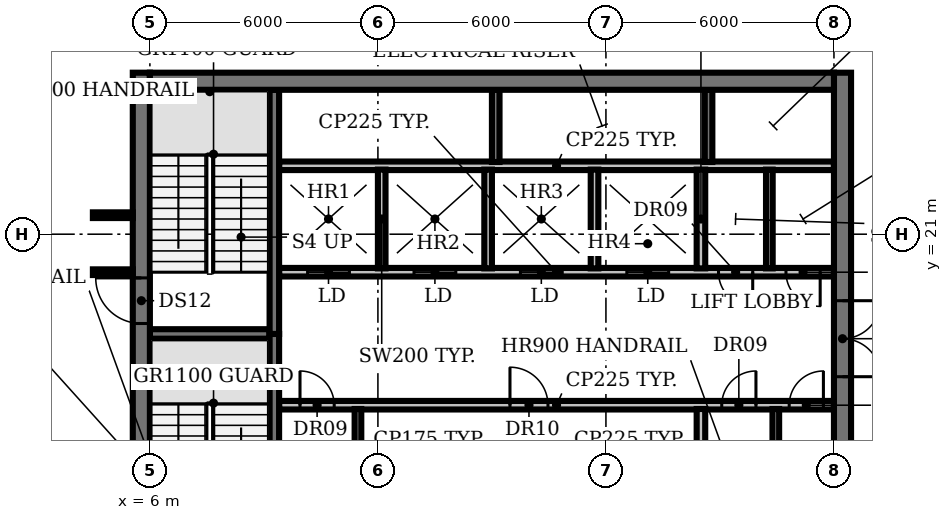
"""IFC4 building model, lengths in metres.
Left out: names, types, materials, properties, quantities, classifications, styles, units other than length and angle.
Written with IfcOpenShell. Run it as: python <this file> out.ifc"""

import sys

from ifc_helpers import new_model, si_unit, direction, frame, frame_2d, origin, place, context, subcontext, project, spatial, rectangle, extrude, element, fill, save


model = new_model("IFC4")
c1 = context("Model", 3, precision=1e-05, world=origin(), true_north=direction((0.0, 1.0)))
c2 = subcontext(c1, "Body", "Model", "MODEL_VIEW")
j1 = project(units=[si_unit("LENGTHUNIT", "METRE"), si_unit("PLANEANGLEUNIT", "RADIAN")], contexts=[c1])
p1 = place(None, origin())
s1 = spatial("IfcSite", under=j1, at=p1, CompositionType="ELEMENT")
p2 = place(p1, origin())
s2 = spatial("IfcBuilding", under=s1, at=p2, CompositionType="ELEMENT")
p3 = place(p2, frame((0.0, 0.0, 247.4)))
s3 = spatial("IfcBuildingStorey", under=s2, at=p3, CompositionType="ELEMENT", Elevation=247.4)
p4 = place(p3, frame((9.4, 16.5, 0.0), z_axis=(0.0, 0.0, 1.0), x_axis=(1.0, 0.0, 0.0)))
e1 = element("IfcWall", 1, at=p4, inside=s3, PredefinedType="PARTITIONING", context=c2, shape_type="SweptSolid", body=[
    extrude(rectangle(XDim=14.6, YDim=0.225, at=frame_2d((7.3, 0.0))), origin(), (0.0, 0.0, 1.0), 3.85),
])
p5 = place(p4, frame((0.55, 0.0, 0.0)))
e2 = element("IfcOpeningElement", 2, at=p5, cuts=e1, PredefinedType="OPENING", context=c2, shape_type="SweptSolid", body=[
    extrude(rectangle(XDim=0.9, YDim=2.1, at=frame_2d((0.45, 1.05))), frame((0.0, 0.123, 0.0), z_axis=(0.0, -1.0, 0.0), x_axis=(1.0, 0.0, 0.0)), (0.0, 0.0, 1.0), 0.245),
])
p6 = place(p4, frame((6.075, 0.0, 0.0)))
e3 = element("IfcOpeningElement", 3, at=p6, cuts=e1, PredefinedType="OPENING", context=c2, shape_type="SweptSolid", body=[
    extrude(rectangle(XDim=1.0, YDim=2.1, at=frame_2d((0.5, 1.05))), frame((0.0, 0.123, 0.0), z_axis=(0.0, -1.0, 0.0), x_axis=(1.0, 0.0, 0.0)), (0.0, 0.0, 1.0), 0.245),
])
p7 = place(p4, frame((11.647, 0.0, 0.0)))
e4 = element("IfcOpeningElement", 4, at=p7, cuts=e1, PredefinedType="OPENING", context=c2, shape_type="SweptSolid", body=[
    extrude(rectangle(XDim=0.9, YDim=2.1, at=frame_2d((0.45, 1.05))), frame((0.0, 0.123, 0.0), z_axis=(0.0, -1.0, 0.0), x_axis=(1.0, 0.0, 0.0)), (0.0, 0.0, 1.0), 0.245),
])
p8 = place(p4, frame((13.423, 0.0, 0.0)))
e5 = element("IfcOpeningElement", 5, at=p8, cuts=e1, PredefinedType="OPENING", context=c2, shape_type="SweptSolid", body=[
    extrude(rectangle(XDim=0.9, YDim=2.1, at=frame_2d((0.45, 1.05))), frame((0.0, 0.123, 0.0), z_axis=(0.0, -1.0, 0.0), x_axis=(1.0, 0.0, 0.0)), (0.0, 0.0, 1.0), 0.245),
])
p9 = place(p3, frame((6.0, 18.375, 0.0), z_axis=(0.0, 0.0, 1.0), x_axis=(1.0, 0.0, 0.0)))
e6 = element("IfcWall", 6, at=p9, inside=s3, PredefinedType="SHEAR", context=c2, shape_type="SweptSolid", body=[
    extrude(rectangle(XDim=3.15, YDim=0.25, at=frame_2d((1.575, 0.0))), origin(), (0.0, 0.0, 1.0), 3.85),
])
p10 = place(p3, frame((24.0, 20.0, 0.0), z_axis=(0.0, 0.0, 1.0), x_axis=(-1.0, 0.0, 0.0)))
e7 = element("IfcWall", 7, at=p10, inside=s3, PredefinedType="PARTITIONING", context=c2, shape_type="SweptSolid", body=[
    extrude(rectangle(XDim=14.6, YDim=0.225, at=frame_2d((7.3, 0.0))), origin(), (0.0, 0.0, 1.0), 3.85),
])
p11 = place(p10, frame((12.75, 0.0, 0.0)))
e8 = element("IfcOpeningElement", 8, at=p11, cuts=e7, PredefinedType="OPENING", context=c2, shape_type="SweptSolid", body=[
    extrude(rectangle(XDim=1.1, YDim=2.1, at=frame_2d((0.55, 1.05))), frame((0.0, 0.123, 0.0), z_axis=(0.0, -1.0, 0.0), x_axis=(1.0, 0.0, 0.0)), (0.0, 0.0, 1.0), 0.245),
])
p12 = place(p10, frame((9.95, 0.0, 0.0)))
e9 = element("IfcOpeningElement", 9, at=p12, cuts=e7, PredefinedType="OPENING", context=c2, shape_type="SweptSolid", body=[
    extrude(rectangle(XDim=1.1, YDim=2.1, at=frame_2d((0.55, 1.05))), frame((0.0, 0.123, 0.0), z_axis=(0.0, -1.0, 0.0), x_axis=(1.0, 0.0, 0.0)), (0.0, 0.0, 1.0), 0.245),
])
p13 = place(p10, frame((7.15, 0.0, 0.0)))
e10 = element("IfcOpeningElement", 10, at=p13, cuts=e7, PredefinedType="OPENING", context=c2, shape_type="SweptSolid", body=[
    extrude(rectangle(XDim=1.1, YDim=2.1, at=frame_2d((0.55, 1.05))), frame((0.0, 0.123, 0.0), z_axis=(0.0, -1.0, 0.0), x_axis=(1.0, 0.0, 0.0)), (0.0, 0.0, 1.0), 0.245),
])
p14 = place(p10, frame((4.35, 0.0, 0.0)))
e11 = element("IfcOpeningElement", 11, at=p14, cuts=e7, PredefinedType="OPENING", context=c2, shape_type="SweptSolid", body=[
    extrude(rectangle(XDim=1.1, YDim=2.1, at=frame_2d((0.55, 1.05))), frame((0.0, 0.123, 0.0), z_axis=(0.0, -1.0, 0.0), x_axis=(1.0, 0.0, 0.0)), (0.0, 0.0, 1.0), 0.245),
])
p15 = place(p10, frame((2.137, 0.0, 0.0)))
e12 = element("IfcOpeningElement", 12, at=p15, cuts=e7, PredefinedType="OPENING", context=c2, shape_type="SweptSolid", body=[
    extrude(rectangle(XDim=0.9, YDim=2.1, at=frame_2d((0.45, 1.05))), frame((0.0, 0.123, 0.0), z_axis=(0.0, -1.0, 0.0), x_axis=(1.0, 0.0, 0.0)), (0.0, 0.0, 1.0), 0.245),
])
p16 = place(p10, frame((0.363, 0.0, 0.0)))
e13 = element("IfcOpeningElement", 13, at=p16, cuts=e7, PredefinedType="OPENING", context=c2, shape_type="SweptSolid", body=[
    extrude(rectangle(XDim=0.9, YDim=2.1, at=frame_2d((0.45, 1.05))), frame((0.0, 0.123, 0.0), z_axis=(0.0, -1.0, 0.0), x_axis=(1.0, 0.0, 0.0)), (0.0, 0.0, 1.0), 0.245),
])
p17 = place(p3, frame((9.4, 22.8, 0.0), z_axis=(0.0, 0.0, 1.0), x_axis=(1.0, 0.0, 0.0)))
e14 = element("IfcWall", 14, at=p17, inside=s3, PredefinedType="PARTITIONING", context=c2, shape_type="SweptSolid", body=[
    extrude(rectangle(XDim=14.6, YDim=0.225, at=frame_2d((7.3, 0.0))), origin(), (0.0, 0.0, 1.0), 3.85),
])
p18 = place(p3, frame((9.275, 18.375, 0.0), z_axis=(0.0, 0.0, 1.0), x_axis=(0.0, -1.0, 0.0)))
e15 = element("IfcWall", 15, at=p18, inside=s3, PredefinedType="SHEAR", context=c2, shape_type="SweptSolid", body=[
    extrude(rectangle(XDim=6.55, YDim=0.25, at=frame_2d((3.275, 0.0))), origin(), (0.0, 0.0, 1.0), 3.85),
])
p19 = place(p18, frame((5.075, 0.0, 0.0)))
e16 = element("IfcOpeningElement", 16, at=p19, cuts=e15, PredefinedType="OPENING", context=c2, shape_type="SweptSolid", body=[
    extrude(rectangle(XDim=1.0, YDim=2.1, at=frame_2d((0.5, 1.05))), frame((0.0, 0.135, 0.0), z_axis=(0.0, -1.0, 0.0), x_axis=(1.0, 0.0, 0.0)), (0.0, 0.0, 1.0), 0.27),
])
p20 = place(p3, frame((9.275, 18.375, 0.0), z_axis=(0.0, 0.0, 1.0), x_axis=(0.0, 1.0, 0.0)))
e17 = element("IfcWall", 17, at=p20, inside=s3, PredefinedType="SHEAR", context=c2, shape_type="SweptSolid", body=[
    extrude(rectangle(XDim=6.425, YDim=0.25, at=frame_2d((3.212, 0.0))), origin(), (0.0, 0.0, 1.0), 3.85),
])
p21 = place(p3, frame((11.475, 13.8, 0.0), z_axis=(0.0, 0.0, 1.0), x_axis=(0.0, 1.0, 0.0)))
e18 = element("IfcWall", 18, at=p21, inside=s3, PredefinedType="PARTITIONING", context=c2, shape_type="SweptSolid", body=[
    extrude(rectangle(XDim=2.6, YDim=0.175, at=frame_2d((1.3, 0.0))), origin(), (0.0, 0.0, 1.0), 3.85),
])
for number, where, z_axis, x_axis in (
    (19, (12.1, 20.1, 0.0), (0.0, 0.0, 1.0), (0.0, 1.0, 0.0)),
    (20, (14.9, 20.1, 0.0), (0.0, 0.0, 1.0), (0.0, 1.0, 0.0)),
):
    element("IfcWall", number, at=place(p3, frame(where, z_axis=z_axis, x_axis=x_axis)), inside=s3, PredefinedType="SOLIDWALL", context=c2, shape_type="SweptSolid", body=[
        extrude(rectangle(XDim=2.6, YDim=0.2, at=frame_2d((1.3, 0.0))), origin(), (0.0, 0.0, 1.0), 3.85),
    ])
p22 = place(p3, frame((15.1, 22.9, 0.0), z_axis=(0.0, 0.0, 1.0), x_axis=(0.0, 1.0, 0.0)))
e21 = element("IfcWall", 21, at=p22, inside=s3, PredefinedType="SHEAR", context=c2, shape_type="SweptSolid", body=[
    extrude(rectangle(XDim=1.9, YDim=0.2, at=frame_2d((0.95, 0.0))), origin(), (0.0, 0.0, 1.0), 3.85),
])
p23 = place(p3, frame((17.7, 20.1, 0.0), z_axis=(0.0, 0.0, 1.0), x_axis=(0.0, 1.0, 0.0)))
e22 = element("IfcWall", 22, at=p23, inside=s3, PredefinedType="SOLIDWALL", context=c2, shape_type="SweptSolid", body=[
    extrude(rectangle(XDim=2.6, YDim=0.2, at=frame_2d((1.3, 0.0))), origin(), (0.0, 0.0, 1.0), 3.85),
])
for number, where, z_axis, x_axis in (
    (23, (20.5, 13.8, 0.0), (0.0, 0.0, 1.0), (0.0, 1.0, 0.0)),
    (24, (20.5, 20.1, 0.0), (0.0, 0.0, 1.0), (0.0, 1.0, 0.0)),
):
    element("IfcWall", number, at=place(p3, frame(where, z_axis=z_axis, x_axis=x_axis)), inside=s3, PredefinedType="PARTITIONING", context=c2, shape_type="SweptSolid", body=[
        extrude(rectangle(XDim=2.6, YDim=0.225, at=frame_2d((1.3, 0.0))), origin(), (0.0, 0.0, 1.0), 3.85),
    ])
p24 = place(p3, frame((20.7, 22.9, 0.0), z_axis=(0.0, 0.0, 1.0), x_axis=(0.0, 1.0, 0.0)))
e25 = element("IfcWall", 25, at=p24, inside=s3, PredefinedType="SHEAR", context=c2, shape_type="SweptSolid", body=[
    extrude(rectangle(XDim=1.9, YDim=0.2, at=frame_2d((0.95, 0.0))), origin(), (0.0, 0.0, 1.0), 3.85),
])
for number, where, z_axis, x_axis in (
    (26, (22.3, 20.1, 0.0), (0.0, 0.0, 1.0), (0.0, 1.0, 0.0)),
    (27, (22.47, 13.8, 0.0), (0.0, 0.0, 1.0), (0.0, 1.0, 0.0)),
):
    element("IfcWall", number, at=place(p3, frame(where, z_axis=z_axis, x_axis=x_axis)), inside=s3, PredefinedType="PARTITIONING", context=c2, shape_type="SweptSolid", body=[
        extrude(rectangle(XDim=2.6, YDim=0.175, at=frame_2d((1.3, 0.0))), origin(), (0.0, 0.0, 1.0), 3.85),
    ])
p25 = place(p3, frame((5.775, 4.42, 0.0), z_axis=(0.0, 0.0, 1.0), x_axis=(0.0, 1.0, 0.0)))
e28 = element("IfcWall", 28, at=p25, inside=s3, PredefinedType="SHEAR", context=c2, shape_type="SweptSolid", body=[
    extrude(rectangle(XDim=20.83, YDim=0.45, at=frame_2d((10.415, 0.0))), origin(), (0.0, 0.0, 1.0), 3.85),
])
p26 = place(p25, frame((1.23, 0.0, 0.0)))
e29 = element("IfcOpeningElement", 29, at=p26, cuts=e28, PredefinedType="OPENING", context=c2, shape_type="SweptSolid", body=[
    extrude(rectangle(XDim=1.5, YDim=2.1, at=frame_2d((0.75, 1.05))), frame((0.0, 0.235, 0.0), z_axis=(0.0, -1.0, 0.0), x_axis=(1.0, 0.0, 0.0)), (0.0, 0.0, 1.0), 0.47),
])
p27 = place(p25, frame((7.68, 0.0, 0.0)))
e30 = element("IfcOpeningElement", 30, at=p27, cuts=e28, PredefinedType="OPENING", context=c2, shape_type="SweptSolid", body=[
    extrude(rectangle(XDim=1.2, YDim=2.1, at=frame_2d((0.6, 1.05))), frame((0.0, 0.235, 0.0), z_axis=(0.0, -1.0, 0.0), x_axis=(1.0, 0.0, 0.0)), (0.0, 0.0, 1.0), 0.47),
])
p28 = place(p25, frame((14.23, 0.0, 0.0)))
e31 = element("IfcOpeningElement", 31, at=p28, cuts=e28, PredefinedType="OPENING", context=c2, shape_type="SweptSolid", body=[
    extrude(rectangle(XDim=1.2, YDim=2.1, at=frame_2d((0.6, 1.05))), frame((0.0, 0.235, 0.0), z_axis=(0.0, -1.0, 0.0), x_axis=(1.0, 0.0, 0.0)), (0.0, 0.0, 1.0), 0.47),
])
p29 = place(p3, frame((24.225, 25.25, 0.0), z_axis=(0.0, 0.0, 1.0), x_axis=(0.0, -1.0, 0.0)))
e32 = element("IfcWall", 32, at=p29, inside=s3, PredefinedType="SHEAR", context=c2, shape_type="SweptSolid", body=[
    extrude(rectangle(XDim=20.83, YDim=0.45, at=frame_2d((10.415, 0.0))), origin(), (0.0, 0.0, 1.0), 3.85),
])
p30 = place(p29, frame((18.1, 0.0, 0.0)))
e33 = element("IfcOpeningElement", 33, at=p30, cuts=e32, PredefinedType="OPENING", context=c2, shape_type="SweptSolid", body=[
    extrude(rectangle(XDim=1.5, YDim=2.1, at=frame_2d((0.75, 1.05))), frame((0.0, 0.235, 0.0), z_axis=(0.0, -1.0, 0.0), x_axis=(1.0, 0.0, 0.0)), (0.0, 0.0, 1.0), 0.47),
])
p31 = place(p29, frame((12.0, 0.0, 0.0)))
e34 = element("IfcOpeningElement", 34, at=p31, cuts=e32, PredefinedType="OPENING", context=c2, shape_type="SweptSolid", body=[
    extrude(rectangle(XDim=0.9, YDim=2.1, at=frame_2d((0.45, 1.05))), frame((0.0, 0.235, 0.0), z_axis=(0.0, -1.0, 0.0), x_axis=(1.0, 0.0, 0.0)), (0.0, 0.0, 1.0), 0.47),
])
p32 = place(p29, frame((6.0, 0.0, 0.0)))
e35 = element("IfcOpeningElement", 35, at=p32, cuts=e32, PredefinedType="OPENING", context=c2, shape_type="SweptSolid", body=[
    extrude(rectangle(XDim=2.0, YDim=2.1, at=frame_2d((1.0, 1.05))), frame((0.0, 0.235, 0.0), z_axis=(0.0, -1.0, 0.0), x_axis=(1.0, 0.0, 0.0)), (0.0, 0.0, 1.0), 0.47),
])
p33 = place(p3, frame((6.0, 25.025, 0.0), z_axis=(0.0, 0.0, 1.0), x_axis=(1.0, 0.0, 0.0)))
e36 = element("IfcWall", 36, at=p33, inside=s3, PredefinedType="SHEAR", context=c2, shape_type="SweptSolid", body=[
    extrude(rectangle(XDim=18.0, YDim=0.45, at=frame_2d((9.0, 0.0))), origin(), (0.0, 0.0, 1.0), 3.85),
])
for number, where, z_axis, x_axis in (
    (37, (4.5, 20.0, 0.0), (0.0, 0.0, 1.0), (1.0, 0.0, 0.0)),
    (38, (4.5, 21.5, 0.0), (0.0, 0.0, 1.0), (1.0, 0.0, 0.0)),
):
    element("IfcWall", number, at=place(p3, frame(where, z_axis=z_axis, x_axis=x_axis)), inside=s3, PredefinedType="PARTITIONING", context=c2, shape_type="SweptSolid", body=[
        extrude(rectangle(XDim=1.05, YDim=0.15, at=frame_2d((0.525, 0.0))), origin(), (0.0, 0.0, 1.0), 2.88),
    ])
p34 = place(p5, origin())
e39 = element("IfcDoor", 39, at=p34, inside=s3, OperationType="SINGLE_SWING_LEFT", PredefinedType="DOOR", context=c2, shape_type="SweptSolid", body=[
    extrude(rectangle(XDim=0.9, YDim=2.1, at=frame_2d((0.45, 1.05))), frame((0.0, 0.025, 0.0), z_axis=(0.0, -1.0, 0.0), x_axis=(1.0, 0.0, 0.0)), (0.0, 0.0, 1.0), 0.05),
])
fill(e2, e39)
p35 = place(p6, origin())
e40 = element("IfcDoor", 40, at=p35, inside=s3, OperationType="SINGLE_SWING_LEFT", PredefinedType="DOOR", context=c2, shape_type="SweptSolid", body=[
    extrude(rectangle(XDim=1.0, YDim=2.1, at=frame_2d((0.5, 1.05))), frame((0.0, 0.025, 0.0), z_axis=(0.0, -1.0, 0.0), x_axis=(1.0, 0.0, 0.0)), (0.0, 0.0, 1.0), 0.05),
])
fill(e3, e40)
p36 = place(p7, origin())
e41 = element("IfcDoor", 41, at=p36, inside=s3, OperationType="SINGLE_SWING_RIGHT", PredefinedType="DOOR", context=c2, shape_type="SweptSolid", body=[
    extrude(rectangle(XDim=0.9, YDim=2.1, at=frame_2d((0.45, 1.05))), frame((0.0, 0.025, 0.0), z_axis=(0.0, -1.0, 0.0), x_axis=(1.0, 0.0, 0.0)), (0.0, 0.0, 1.0), 0.05),
])
fill(e4, e41)
p37 = place(p8, origin())
e42 = element("IfcDoor", 42, at=p37, inside=s3, OperationType="SINGLE_SWING_RIGHT", PredefinedType="DOOR", context=c2, shape_type="SweptSolid", body=[
    extrude(rectangle(XDim=0.9, YDim=2.1, at=frame_2d((0.45, 1.05))), frame((0.0, 0.025, 0.0), z_axis=(0.0, -1.0, 0.0), x_axis=(1.0, 0.0, 0.0)), (0.0, 0.0, 1.0), 0.05),
])
fill(e5, e42)
p38 = place(p11, origin())
e43 = element("IfcDoor", 43, at=p38, inside=s3, OperationType="DOUBLE_DOOR_SLIDING", PredefinedType="DOOR", context=c2, shape_type="SweptSolid", body=[
    extrude(rectangle(XDim=1.1, YDim=2.1, at=frame_2d((0.55, 1.05))), frame((0.0, 0.025, 0.0), z_axis=(0.0, -1.0, 0.0), x_axis=(1.0, 0.0, 0.0)), (0.0, 0.0, 1.0), 0.05),
])
fill(e8, e43)
p39 = place(p12, origin())
e44 = element("IfcDoor", 44, at=p39, inside=s3, OperationType="DOUBLE_DOOR_SLIDING", PredefinedType="DOOR", context=c2, shape_type="SweptSolid", body=[
    extrude(rectangle(XDim=1.1, YDim=2.1, at=frame_2d((0.55, 1.05))), frame((0.0, 0.025, 0.0), z_axis=(0.0, -1.0, 0.0), x_axis=(1.0, 0.0, 0.0)), (0.0, 0.0, 1.0), 0.05),
])
fill(e9, e44)
p40 = place(p13, origin())
e45 = element("IfcDoor", 45, at=p40, inside=s3, OperationType="DOUBLE_DOOR_SLIDING", PredefinedType="DOOR", context=c2, shape_type="SweptSolid", body=[
    extrude(rectangle(XDim=1.1, YDim=2.1, at=frame_2d((0.55, 1.05))), frame((0.0, 0.025, 0.0), z_axis=(0.0, -1.0, 0.0), x_axis=(1.0, 0.0, 0.0)), (0.0, 0.0, 1.0), 0.05),
])
fill(e10, e45)
p41 = place(p14, origin())
e46 = element("IfcDoor", 46, at=p41, inside=s3, OperationType="DOUBLE_DOOR_SLIDING", PredefinedType="DOOR", context=c2, shape_type="SweptSolid", body=[
    extrude(rectangle(XDim=1.1, YDim=2.1, at=frame_2d((0.55, 1.05))), frame((0.0, 0.025, 0.0), z_axis=(0.0, -1.0, 0.0), x_axis=(1.0, 0.0, 0.0)), (0.0, 0.0, 1.0), 0.05),
])
fill(e11, e46)
p42 = place(p15, origin())
e47 = element("IfcDoor", 47, at=p42, inside=s3, OperationType="SINGLE_SWING_LEFT", PredefinedType="DOOR", context=c2, shape_type="SweptSolid", body=[
    extrude(rectangle(XDim=0.9, YDim=2.1, at=frame_2d((0.45, 1.05))), frame((0.0, 0.025, 0.0), z_axis=(0.0, -1.0, 0.0), x_axis=(1.0, 0.0, 0.0)), (0.0, 0.0, 1.0), 0.05),
])
fill(e12, e47)
p43 = place(p16, origin())
e48 = element("IfcDoor", 48, at=p43, inside=s3, OperationType="SINGLE_SWING_LEFT", PredefinedType="DOOR", context=c2, shape_type="SweptSolid", body=[
    extrude(rectangle(XDim=0.9, YDim=2.1, at=frame_2d((0.45, 1.05))), frame((0.0, 0.025, 0.0), z_axis=(0.0, -1.0, 0.0), x_axis=(1.0, 0.0, 0.0)), (0.0, 0.0, 1.0), 0.05),
])
fill(e13, e48)
p44 = place(p28, origin())
e49 = element("IfcDoor", 49, at=p44, inside=s3, OperationType="SINGLE_SWING_RIGHT", PredefinedType="DOOR", context=c2, shape_type="SweptSolid", body=[
    extrude(rectangle(XDim=1.2, YDim=2.1, at=frame_2d((0.6, 1.05))), frame((0.0, 0.025, 0.0), z_axis=(0.0, -1.0, 0.0), x_axis=(1.0, 0.0, 0.0)), (0.0, 0.0, 1.0), 0.05),
])
fill(e31, e49)
p45 = place(p32, origin())
e50 = element("IfcDoor", 50, at=p45, inside=s3, OperationType="DOUBLE_DOOR_SINGLE_SWING", PredefinedType="DOOR", context=c2, shape_type="SweptSolid", body=[
    extrude(rectangle(XDim=2.0, YDim=2.1, at=frame_2d((1.0, 1.05))), frame((0.0, 0.025, 0.0), z_axis=(0.0, -1.0, 0.0), x_axis=(1.0, 0.0, 0.0)), (0.0, 0.0, 1.0), 0.05),
])
fill(e35, e50)
save(model, sys.argv[1])
